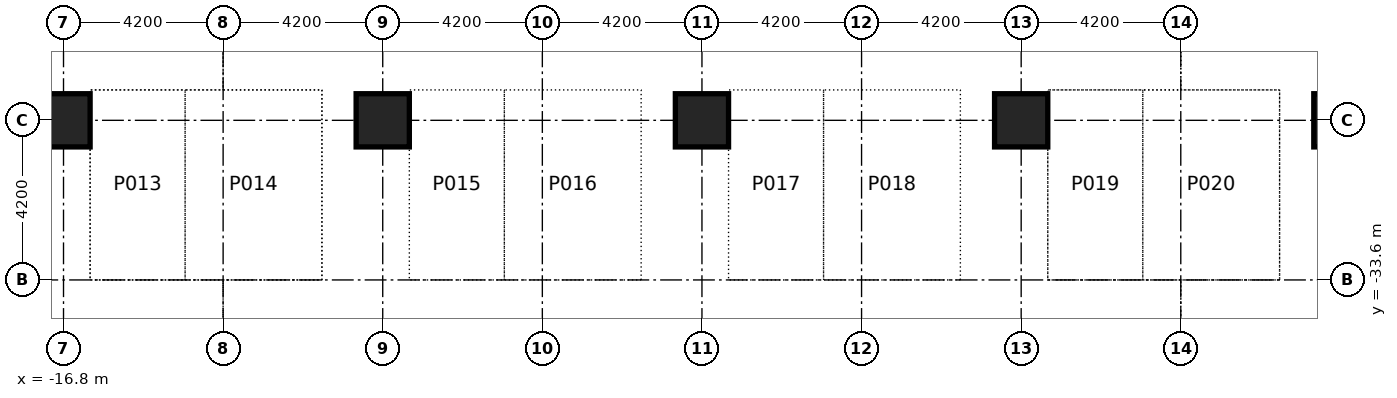
"""IFC4 building model, lengths in metres.
Left out: names, types, materials, properties, quantities, classifications, styles, units other than length and angle.
Written with IfcOpenShell. Run it as: python <this file> out.ifc"""

import sys

from ifc_helpers import new_model, si_unit, direction, frame, origin, origin_2d, place, context, subcontext, project, spatial, rectangle, extrude, element, save


model = new_model("IFC4")
c1 = context("Model", 3, precision=1e-05, world=origin(), true_north=direction((0.0, 1.0)))
c2 = subcontext(c1, "Body", "Model", "MODEL_VIEW")
j1 = project(units=[si_unit("LENGTHUNIT", "METRE"), si_unit("PLANEANGLEUNIT", "RADIAN")], contexts=[c1])
p1 = place(None, origin())
s1 = spatial("IfcSite", under=j1, at=p1, CompositionType="ELEMENT")
p2 = place(p1, origin())
s2 = spatial("IfcBuilding", under=s1, at=p2, CompositionType="ELEMENT")
p3 = place(p2, frame((0.0, 0.0, -4.2)))
s3 = spatial("IfcBuildingStorey", under=s2, at=p3, CompositionType="ELEMENT", Elevation=-4.2)
for number, where, z_axis, x_axis in (
    (1, (-16.8, -29.4, 0.0), (0.0, 0.0, 1.0), (1.0, 0.0, 0.0)),
    (2, (-8.4, -29.4, 0.0), (0.0, 0.0, 1.0), (1.0, 0.0, 0.0)),
    (3, (0.0, -29.4, 0.0), (0.0, 0.0, 1.0), (1.0, 0.0, 0.0)),
    (4, (8.4, -29.4, 0.0), (0.0, 0.0, 1.0), (1.0, 0.0, 0.0)),
    (5, (16.8, -29.4, 0.0), (0.0, 0.0, 1.0), (1.0, 0.0, 0.0)),
):
    element("IfcColumn", number, at=place(p3, frame(where, z_axis=z_axis, x_axis=x_axis)), inside=s3, PredefinedType="COLUMN", context=c2, shape_type="SweptSolid", body=[
        extrude(rectangle(XDim=1.4, YDim=1.4, at=origin_2d()), origin(), (0.0, 0.0, 1.0), 4.2),
    ])
save(model, sys.argv[1])
